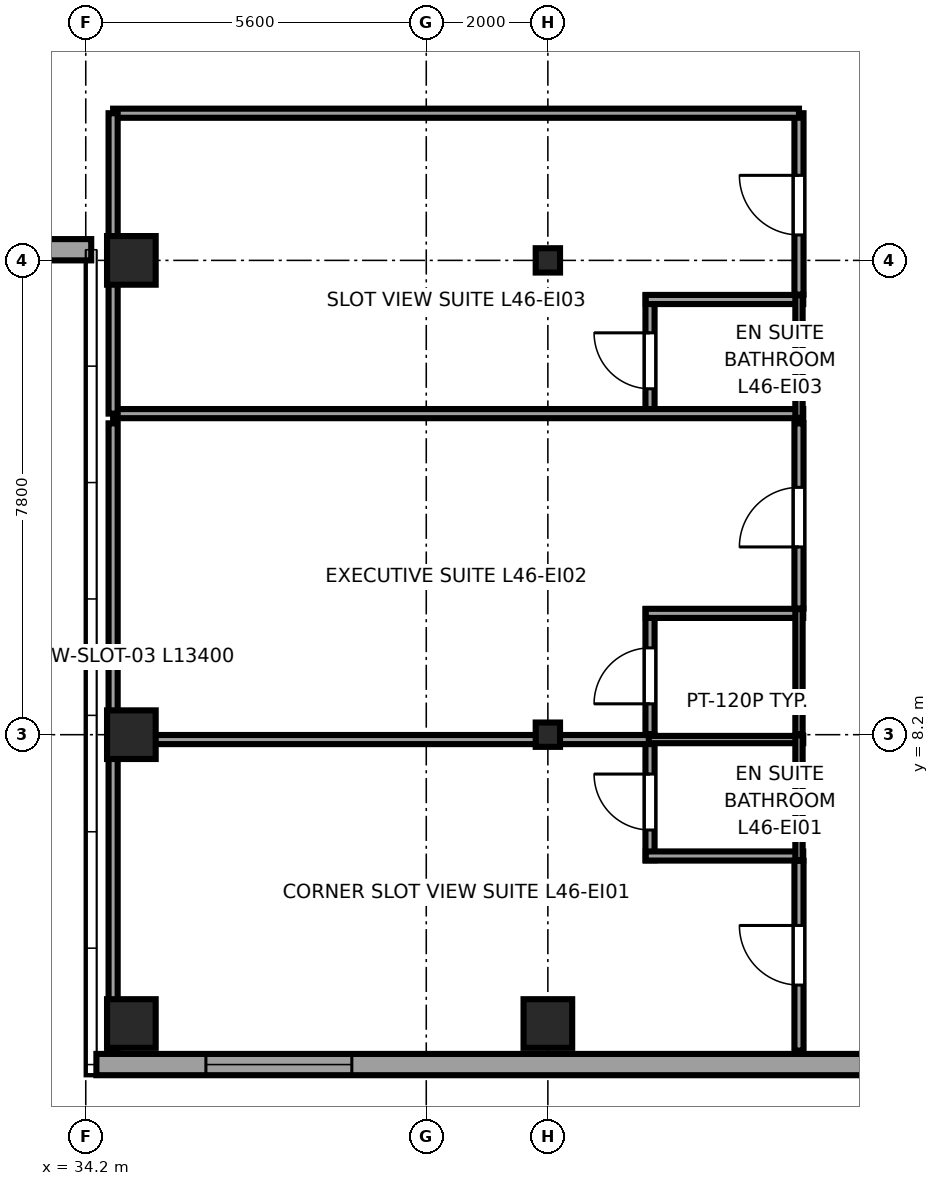
"""IFC4 building model, lengths in metres.
Left out: names, types, materials, properties, quantities, classifications, styles, units other than length and angle.
Written with IfcOpenShell. Run it as: python <this file> out.ifc"""

import sys

from ifc_helpers import new_model, si_unit, direction, frame, frame_2d, origin, origin_2d, place, context, subcontext, project, spatial, rectangle, i_section, extrude, source, transform, mapped, element, fill, save


model = new_model("IFC4")
c1 = context("Model", 3, precision=1e-05, world=origin(), true_north=direction((0.0, 1.0)))
c2 = subcontext(c1, "Body", "Model", "MODEL_VIEW")
j1 = project(units=[si_unit("LENGTHUNIT", "METRE"), si_unit("PLANEANGLEUNIT", "RADIAN")], contexts=[c1])
p1 = place(None, origin())
s1 = spatial("IfcSite", under=j1, at=p1, CompositionType="ELEMENT")
p2 = place(p1, origin())
s2 = spatial("IfcBuilding", under=s1, at=p2, CompositionType="ELEMENT")
p3 = place(p2, frame((0.0, 0.0, 175.45)))
s3 = spatial("IfcBuildingStorey", under=s2, at=p3, CompositionType="ELEMENT", Elevation=175.45)
m1 = source(origin(), c2, "Body", "SweptSolid", [
    extrude(rectangle(XDim=0.8, YDim=0.8, at=origin_2d()), origin(), (0.0, 0.0, 1.0), 3.55),
])
for number, where, z_axis, x_axis in (
    (1, (34.95, 3.45, 0.0), (0.0, 0.0, 1.0), (1.0, 0.0, 0.0)),
    (2, (34.95, 8.2, 0.0), (0.0, 0.0, 1.0), (1.0, 0.0, 0.0)),
    (3, (34.95, 16.0, 0.0), (0.0, 0.0, 1.0), (1.0, 0.0, 0.0)),
    (4, (41.8, 3.45, 0.0), (0.0, 0.0, 1.0), (1.0, 0.0, 0.0)),
):
    element("IfcColumn", number, at=place(p3, frame(where, z_axis=z_axis, x_axis=x_axis)), inside=s3, PredefinedType="COLUMN", context=c2, shape_type="MappedRepresentation", body=[
        mapped(m1, transform((0.0, 0.0, 0.0), x_axis=(1.0, 0.0, 0.0), y_axis=(0.0, 1.0, 0.0), z_axis=(0.0, 0.0, 1.0), scale=1.0)),
    ])
m2 = source(origin(), c2, "Body", "SweptSolid", [
    extrude(i_section(OverallWidth=0.4, OverallDepth=0.4, WebThickness=0.02, FlangeThickness=0.035, at=origin_2d()), origin(), (0.0, 0.0, 1.0), 3.55),
])
for number, where, z_axis, x_axis in (
    (5, (41.8, 8.2, 0.0), (0.0, 0.0, 1.0), (1.0, 0.0, 0.0)),
    (6, (41.8, 16.0, 0.0), (0.0, 0.0, 1.0), (1.0, 0.0, 0.0)),
):
    element("IfcColumn", number, at=place(p3, frame(where, z_axis=z_axis, x_axis=x_axis)), inside=s3, PredefinedType="COLUMN", context=c2, shape_type="MappedRepresentation", body=[
        mapped(m2, transform((0.0, 0.0, 0.0), x_axis=(1.0, 0.0, 0.0), y_axis=(0.0, 1.0, 0.0), z_axis=(0.0, 0.0, 1.0), scale=1.0)),
    ])
p4 = place(p3, frame((22.71, 16.175, 0.0), z_axis=(0.0, 0.0, 1.0), x_axis=(1.0, 0.0, 0.0)))
e7 = element("IfcWall", 7, at=p4, inside=s3, PredefinedType="SOLIDWALL", context=c2, shape_type="SweptSolid", body=[
    extrude(rectangle(XDim=11.58, YDim=0.35, at=frame_2d((5.79, 0.0))), origin(), (0.0, 0.0, 1.0), 2.758),
])
p5 = place(p4, frame((1.995, 0.0, 0.68)))
e8 = element("IfcOpeningElement", 8, at=p5, cuts=e7, PredefinedType="OPENING", context=c2, shape_type="SweptSolid", body=[
    extrude(rectangle(XDim=2.4, YDim=1.9, at=frame_2d((1.2, 0.95))), frame((0.0, 0.185, 0.0), z_axis=(0.0, -1.0, 0.0), x_axis=(1.0, 0.0, 0.0)), (0.0, 0.0, 1.0), 0.37),
])
p6 = place(p4, frame((7.185, 0.0, 0.68)))
e9 = element("IfcOpeningElement", 9, at=p6, cuts=e7, PredefinedType="OPENING", context=c2, shape_type="SweptSolid", body=[
    extrude(rectangle(XDim=2.4, YDim=1.9, at=frame_2d((1.2, 0.95))), frame((0.0, 0.185, 0.0), z_axis=(0.0, -1.0, 0.0), x_axis=(1.0, 0.0, 0.0)), (0.0, 0.0, 1.0), 0.37),
])
p7 = place(p3, frame((34.375, 2.775, 0.0), z_axis=(0.0, 0.0, 1.0), x_axis=(1.0, 0.0, 0.0)))
e10 = element("IfcWall", 10, at=p7, inside=s3, PredefinedType="SOLIDWALL", context=c2, shape_type="SweptSolid", body=[
    extrude(rectangle(XDim=15.608, YDim=0.35, at=frame_2d((7.804, 0.0))), origin(), (0.0, 0.0, 1.0), 3.37),
])
p8 = place(p7, frame((1.801, 0.0, 0.68)))
e11 = element("IfcOpeningElement", 11, at=p8, cuts=e10, PredefinedType="OPENING", context=c2, shape_type="SweptSolid", body=[
    extrude(rectangle(XDim=2.4, YDim=1.9, at=frame_2d((1.2, 0.95))), frame((0.0, 0.185, 0.0), z_axis=(0.0, -1.0, 0.0), x_axis=(1.0, 0.0, 0.0)), (0.0, 0.0, 1.0), 0.37),
])
p9 = place(p7, frame((13.866, 0.0, 0.58)))
e12 = element("IfcOpeningElement", 12, at=p9, cuts=e10, PredefinedType="OPENING", context=c2, shape_type="SweptSolid", body=[
    extrude(rectangle(XDim=1.35, YDim=1.6, at=frame_2d((0.675, 0.8))), frame((0.0, 0.185, 0.0), z_axis=(0.0, -1.0, 0.0), x_axis=(1.0, 0.0, 0.0)), (0.0, 0.0, 1.0), 0.37),
])
p10 = place(p3, frame((43.48, 6.135, 0.0), z_axis=(0.0, 0.0, 1.0), x_axis=(0.0, 1.0, 0.0)))
e13 = element("IfcWall", 13, at=p10, inside=s3, PredefinedType="PARTITIONING", context=c2, shape_type="SweptSolid", body=[
    extrude(rectangle(XDim=2.055, YDim=0.15, at=frame_2d((1.027, 0.0))), origin(), (0.0, 0.0, 1.0), 3.37),
])
p11 = place(p10, frame((0.498, 0.0, 0.0)))
e14 = element("IfcOpeningElement", 14, at=p11, cuts=e13, PredefinedType="OPENING", context=c2, shape_type="SweptSolid", body=[
    extrude(rectangle(XDim=0.92, YDim=2.01, at=frame_2d((0.46, 1.005))), frame((0.0, 0.085, 0.0), z_axis=(0.0, -1.0, 0.0), x_axis=(1.0, 0.0, 0.0)), (0.0, 0.0, 1.0), 0.17),
])
p12 = place(p3, frame((43.41, 6.205, 0.0), z_axis=(0.0, 0.0, 1.0), x_axis=(1.0, 0.0, 0.0)))
e15 = element("IfcWall", 15, at=p12, inside=s3, PredefinedType="PARTITIONING", context=c2, shape_type="SweptSolid", body=[
    extrude(rectangle(XDim=2.59, YDim=0.15, at=frame_2d((1.295, 0.0))), origin(), (0.0, 0.0, 1.0), 3.37),
])
p13 = place(p3, frame((43.41, 8.12, 0.0), z_axis=(0.0, 0.0, 1.0), x_axis=(1.0, 0.0, 0.0)))
e16 = element("IfcWall", 16, at=p13, inside=s3, PredefinedType="PLUMBINGWALL", context=c2, shape_type="SweptSolid", body=[
    extrude(rectangle(XDim=2.59, YDim=0.12, at=frame_2d((1.295, 0.0))), origin(), (0.0, 0.0, 1.0), 2.758),
])
p14 = place(p3, frame((45.93, 6.135, 0.0), z_axis=(0.0, 0.0, 1.0), x_axis=(0.0, 1.0, 0.0)))
e17 = element("IfcWall", 17, at=p14, inside=s3, PredefinedType="PLUMBINGWALL", context=c2, shape_type="SweptSolid", body=[
    extrude(rectangle(XDim=2.055, YDim=0.12, at=frame_2d((1.027, 0.0))), origin(), (0.0, 0.0, 1.0), 3.37),
])
p15 = place(p3, frame((43.48, 8.21, 0.0), z_axis=(0.0, 0.0, 1.0), x_axis=(0.0, 1.0, 0.0)))
e18 = element("IfcWall", 18, at=p15, inside=s3, PredefinedType="PARTITIONING", context=c2, shape_type="SweptSolid", body=[
    extrude(rectangle(XDim=2.055, YDim=0.15, at=frame_2d((1.027, 0.0))), origin(), (0.0, 0.0, 1.0), 3.37),
])
p16 = place(p15, frame((0.498, 0.0, 0.0)))
e19 = element("IfcOpeningElement", 19, at=p16, cuts=e18, PredefinedType="OPENING", context=c2, shape_type="SweptSolid", body=[
    extrude(rectangle(XDim=0.92, YDim=2.01, at=frame_2d((0.46, 1.005))), frame((0.0, 0.085, 0.0), z_axis=(0.0, -1.0, 0.0), x_axis=(1.0, 0.0, 0.0)), (0.0, 0.0, 1.0), 0.17),
])
p17 = place(p3, frame((43.41, 10.195, 0.0), z_axis=(0.0, 0.0, 1.0), x_axis=(1.0, 0.0, 0.0)))
e20 = element("IfcWall", 20, at=p17, inside=s3, PredefinedType="PARTITIONING", context=c2, shape_type="SweptSolid", body=[
    extrude(rectangle(XDim=2.59, YDim=0.15, at=frame_2d((1.295, 0.0))), origin(), (0.0, 0.0, 1.0), 3.37),
])
p18 = place(p3, frame((45.93, 8.21, 0.0), z_axis=(0.0, 0.0, 1.0), x_axis=(0.0, 1.0, 0.0)))
e21 = element("IfcWall", 21, at=p18, inside=s3, PredefinedType="PLUMBINGWALL", context=c2, shape_type="SweptSolid", body=[
    extrude(rectangle(XDim=2.055, YDim=0.12, at=frame_2d((1.027, 0.0))), origin(), (0.0, 0.0, 1.0), 3.37),
])
p19 = place(p3, frame((43.48, 13.41, 0.0), z_axis=(0.0, 0.0, 1.0), x_axis=(0.0, 1.0, 0.0)))
e22 = element("IfcWall", 22, at=p19, inside=s3, PredefinedType="PARTITIONING", context=c2, shape_type="SweptSolid", body=[
    extrude(rectangle(XDim=2.017, YDim=0.15, at=frame_2d((1.009, 0.0))), origin(), (0.0, 0.0, 1.0), 3.37),
])
p20 = place(p19, frame((0.479, 0.0, 0.0)))
e23 = element("IfcOpeningElement", 23, at=p20, cuts=e22, PredefinedType="OPENING", context=c2, shape_type="SweptSolid", body=[
    extrude(rectangle(XDim=0.92, YDim=2.01, at=frame_2d((0.46, 1.005))), frame((0.0, 0.085, 0.0), z_axis=(0.0, -1.0, 0.0), x_axis=(1.0, 0.0, 0.0)), (0.0, 0.0, 1.0), 0.17),
])
p21 = place(p3, frame((34.65, 13.48, 0.0), z_axis=(0.0, 0.0, 1.0), x_axis=(1.0, 0.0, 0.0)))
e24 = element("IfcWall", 24, at=p21, inside=s3, PredefinedType="PARTITIONING", context=c2, shape_type="SweptSolid", body=[
    extrude(rectangle(XDim=11.35, YDim=0.15, at=frame_2d((5.675, 0.0))), origin(), (0.0, 0.0, 1.0), 3.37),
])
p22 = place(p3, frame((43.41, 15.357, 0.0), z_axis=(0.0, 0.0, 1.0), x_axis=(1.0, 0.0, 0.0)))
e25 = element("IfcWall", 25, at=p22, inside=s3, PredefinedType="PARTITIONING", context=c2, shape_type="SweptSolid", body=[
    extrude(rectangle(XDim=2.59, YDim=0.15, at=frame_2d((1.295, 0.0))), origin(), (0.0, 0.0, 1.0), 3.37),
])
p23 = place(p3, frame((45.93, 13.41, 0.0), z_axis=(0.0, 0.0, 1.0), x_axis=(0.0, 1.0, 0.0)))
e26 = element("IfcWall", 26, at=p23, inside=s3, PredefinedType="PLUMBINGWALL", context=c2, shape_type="SweptSolid", body=[
    extrude(rectangle(XDim=2.017, YDim=0.12, at=frame_2d((1.009, 0.0))), origin(), (0.0, 0.0, 1.0), 3.37),
])
p24 = place(p3, frame((45.93, 3.005, 0.0), z_axis=(0.0, 0.0, 1.0), x_axis=(0.0, 1.0, 0.0)))
e27 = element("IfcWall", 27, at=p24, inside=s3, PredefinedType="PARTITIONING", context=c2, shape_type="SweptSolid", body=[
    extrude(rectangle(XDim=3.12, YDim=0.15, at=frame_2d((1.56, 0.0))), origin(), (0.0, 0.0, 1.0), 3.37),
])
p25 = place(p24, frame((1.077, 0.0, 0.0)))
e28 = element("IfcOpeningElement", 28, at=p25, cuts=e27, PredefinedType="OPENING", context=c2, shape_type="SweptSolid", body=[
    extrude(rectangle(XDim=0.98, YDim=2.12, at=frame_2d((0.49, 1.06))), frame((0.0, 0.085, 0.0), z_axis=(0.0, -1.0, 0.0), x_axis=(1.0, 0.0, 0.0)), (0.0, 0.0, 1.0), 0.17),
])
p26 = place(p3, frame((34.65, 8.12, 0.0), z_axis=(0.0, 0.0, 1.0), x_axis=(1.0, 0.0, 0.0)))
e29 = element("IfcWall", 29, at=p26, inside=s3, PredefinedType="PARTITIONING", context=c2, shape_type="SweptSolid", body=[
    extrude(rectangle(XDim=8.81, YDim=0.15, at=frame_2d((4.405, 0.0))), origin(), (0.0, 0.0, 1.0), 2.758),
])
p27 = place(p3, frame((34.65, 3.005, 0.0), z_axis=(0.0, 0.0, 1.0), x_axis=(0.0, 1.0, 0.0)))
e30 = element("IfcWall", 30, at=p27, inside=s3, PredefinedType="PARTITIONING", context=c2, shape_type="SweptSolid", body=[
    extrude(rectangle(XDim=5.115, YDim=0.15, at=frame_2d((2.558, 0.0))), origin(), (0.0, 0.0, 1.0), 3.37),
])
p28 = place(p3, frame((45.93, 10.275, 0.0), z_axis=(0.0, 0.0, 1.0), x_axis=(0.0, 1.0, 0.0)))
e31 = element("IfcWall", 31, at=p28, inside=s3, PredefinedType="PARTITIONING", context=c2, shape_type="SweptSolid", body=[
    extrude(rectangle(XDim=3.045, YDim=0.15, at=frame_2d((1.522, 0.0))), origin(), (0.0, 0.0, 1.0), 3.37),
])
p29 = place(p28, frame((1.012, 0.0, 0.0)))
e32 = element("IfcOpeningElement", 32, at=p29, cuts=e31, PredefinedType="OPENING", context=c2, shape_type="SweptSolid", body=[
    extrude(rectangle(XDim=0.98, YDim=2.12, at=frame_2d((0.49, 1.06))), frame((0.0, 0.085, 0.0), z_axis=(0.0, -1.0, 0.0), x_axis=(1.0, 0.0, 0.0)), (0.0, 0.0, 1.0), 0.17),
])
p30 = place(p3, frame((34.65, 8.28, 0.0), z_axis=(0.0, 0.0, 1.0), x_axis=(0.0, 1.0, 0.0)))
e33 = element("IfcWall", 33, at=p30, inside=s3, PredefinedType="PARTITIONING", context=c2, shape_type="SweptSolid", body=[
    extrude(rectangle(XDim=5.04, YDim=0.15, at=frame_2d((2.52, 0.0))), origin(), (0.0, 0.0, 1.0), 3.37),
])
p31 = place(p3, frame((45.93, 15.437, 0.0), z_axis=(0.0, 0.0, 1.0), x_axis=(0.0, 1.0, 0.0)))
e34 = element("IfcWall", 34, at=p31, inside=s3, PredefinedType="PARTITIONING", context=c2, shape_type="SweptSolid", body=[
    extrude(rectangle(XDim=2.983, YDim=0.15, at=frame_2d((1.491, 0.0))), origin(), (0.0, 0.0, 1.0), 3.37),
])
p32 = place(p31, frame((0.981, 0.0, 0.0)))
e35 = element("IfcOpeningElement", 35, at=p32, cuts=e34, PredefinedType="OPENING", context=c2, shape_type="SweptSolid", body=[
    extrude(rectangle(XDim=0.98, YDim=2.12, at=frame_2d((0.49, 1.06))), frame((0.0, 0.085, 0.0), z_axis=(0.0, -1.0, 0.0), x_axis=(1.0, 0.0, 0.0)), (0.0, 0.0, 1.0), 0.17),
])
p33 = place(p3, frame((34.65, 18.42, 0.0), z_axis=(0.0, 0.0, 1.0), x_axis=(1.0, 0.0, 0.0)))
e36 = element("IfcWall", 36, at=p33, inside=s3, PredefinedType="PARTITIONING", context=c2, shape_type="SweptSolid", body=[
    extrude(rectangle(XDim=11.28, YDim=0.15, at=frame_2d((5.64, 0.0))), origin(), (0.0, 0.0, 1.0), 3.37),
])
p34 = place(p3, frame((34.65, 13.48, 0.0), z_axis=(0.0, 0.0, 1.0), x_axis=(0.0, 1.0, 0.0)))
e37 = element("IfcWall", 37, at=p34, inside=s3, PredefinedType="PARTITIONING", context=c2, shape_type="SweptSolid", body=[
    extrude(rectangle(XDim=4.94, YDim=0.15, at=frame_2d((2.47, 0.0))), origin(), (0.0, 0.0, 1.0), 3.37),
])
m3 = source(origin(), c2, "Body", "SweptSolid", [
    extrude(rectangle(XDim=2.4, YDim=1.9, at=frame_2d((1.2, 0.95))), frame((0.0, 0.09, 0.0), z_axis=(0.0, -1.0, 0.0), x_axis=(1.0, 0.0, 0.0)), (0.0, 0.0, 1.0), 0.06),
])
p35 = place(p8, origin())
e38 = element("IfcWindow", 38, at=p35, inside=s3, PartitioningType="TRIPLE_PANEL_HORIZONTAL", PredefinedType="WINDOW", context=c2, shape_type="MappedRepresentation", body=[
    mapped(m3, transform((0.0, 0.0, 0.0), x_axis=(1.0, 0.0, 0.0), y_axis=(0.0, 1.0, 0.0), z_axis=(0.0, 0.0, 1.0), scale=1.0)),
])
fill(e11, e38)
m4 = source(origin(), c2, "Body", "SweptSolid", [
    extrude(rectangle(XDim=0.92, YDim=2.01, at=frame_2d((0.46, 1.005))), frame((0.0, 0.025, 0.0), z_axis=(0.0, -1.0, 0.0), x_axis=(1.0, 0.0, 0.0)), (0.0, 0.0, 1.0), 0.05),
])
p36 = place(p11, origin())
e39 = element("IfcDoor", 39, at=p36, inside=s3, OperationType="SINGLE_SWING_RIGHT", PredefinedType="DOOR", context=c2, shape_type="MappedRepresentation", body=[
    mapped(m4, transform((0.0, 0.0, 0.0), x_axis=(1.0, 0.0, 0.0), y_axis=(0.0, 1.0, 0.0), z_axis=(0.0, 0.0, 1.0), scale=1.0)),
])
fill(e14, e39)
p37 = place(p16, origin())
e40 = element("IfcDoor", 40, at=p37, inside=s3, OperationType="SINGLE_SWING_LEFT", PredefinedType="DOOR", context=c2, shape_type="MappedRepresentation", body=[
    mapped(m4, transform((0.0, 0.0, 0.0), x_axis=(1.0, 0.0, 0.0), y_axis=(0.0, 1.0, 0.0), z_axis=(0.0, 0.0, 1.0), scale=1.0)),
])
fill(e19, e40)
p38 = place(p20, origin())
e41 = element("IfcDoor", 41, at=p38, inside=s3, OperationType="SINGLE_SWING_RIGHT", PredefinedType="DOOR", context=c2, shape_type="MappedRepresentation", body=[
    mapped(m4, transform((0.0, 0.0, 0.0), x_axis=(1.0, 0.0, 0.0), y_axis=(0.0, 1.0, 0.0), z_axis=(0.0, 0.0, 1.0), scale=1.0)),
])
fill(e23, e41)
m5 = source(origin(), c2, "Body", "SweptSolid", [
    extrude(rectangle(XDim=0.98, YDim=2.12, at=frame_2d((0.49, 1.06))), frame((0.0, 0.025, 0.0), z_axis=(0.0, -1.0, 0.0), x_axis=(1.0, 0.0, 0.0)), (0.0, 0.0, 1.0), 0.05),
])
p39 = place(p25, origin())
e42 = element("IfcDoor", 42, at=p39, inside=s3, OperationType="SINGLE_SWING_RIGHT", PredefinedType="DOOR", context=c2, shape_type="MappedRepresentation", body=[
    mapped(m5, transform((0.0, 0.0, 0.0), x_axis=(1.0, 0.0, 0.0), y_axis=(0.0, 1.0, 0.0), z_axis=(0.0, 0.0, 1.0), scale=1.0)),
])
fill(e28, e42)
p40 = place(p29, origin())
e43 = element("IfcDoor", 43, at=p40, inside=s3, OperationType="SINGLE_SWING_LEFT", PredefinedType="DOOR", context=c2, shape_type="MappedRepresentation", body=[
    mapped(m5, transform((0.0, 0.0, 0.0), x_axis=(1.0, 0.0, 0.0), y_axis=(0.0, 1.0, 0.0), z_axis=(0.0, 0.0, 1.0), scale=1.0)),
])
fill(e32, e43)
p41 = place(p32, origin())
e44 = element("IfcDoor", 44, at=p41, inside=s3, OperationType="SINGLE_SWING_RIGHT", PredefinedType="DOOR", context=c2, shape_type="MappedRepresentation", body=[
    mapped(m5, transform((0.0, 0.0, 0.0), x_axis=(1.0, 0.0, 0.0), y_axis=(0.0, 1.0, 0.0), z_axis=(0.0, 0.0, 1.0), scale=1.0)),
])
fill(e35, e44)
save(model, sys.argv[1])
